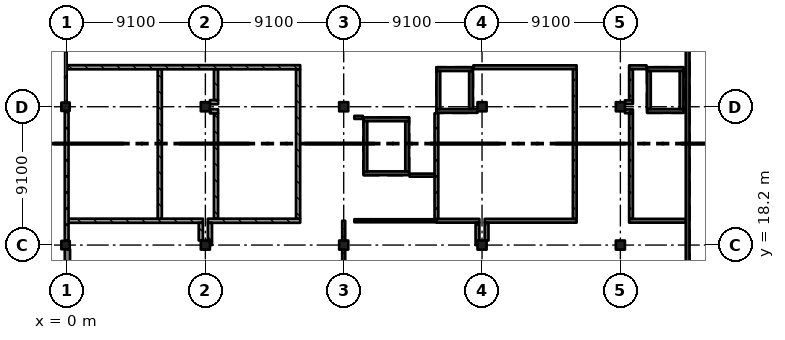
"""IFC4 building model, lengths in metres.
Left out: names, types, materials, properties, quantities, classifications, styles, units other than length and angle.
Written with IfcOpenShell. Run it as: python <this file> out.ifc"""

import sys

from ifc_helpers import new_model, si_unit, direction, frame, frame_2d, origin, origin_2d, place, context, subcontext, project, spatial, rectangle, extrude, element, fill, save


model = new_model("IFC4")
c1 = context("Model", 3, precision=1e-05, world=origin(), true_north=direction((0.0, 1.0)))
c2 = subcontext(c1, "Body", "Model", "MODEL_VIEW")
j1 = project(units=[si_unit("LENGTHUNIT", "METRE"), si_unit("PLANEANGLEUNIT", "RADIAN")], contexts=[c1])
p1 = place(None, origin())
s1 = spatial("IfcSite", under=j1, at=p1, CompositionType="ELEMENT")
p2 = place(p1, origin())
s2 = spatial("IfcBuilding", under=s1, at=p2, CompositionType="ELEMENT")
p3 = place(p2, frame((0.0, 0.0, 20.02)))
s3 = spatial("IfcBuildingStorey", under=s2, at=p3, CompositionType="ELEMENT", Elevation=20.02)
for number, where, z_axis, x_axis in (
    (1, (-0.1, 18.2, 0.0), (0.0, 0.0, 1.0), (1.0, 0.0, 0.0)),
    (2, (-0.1, 27.3, 0.0), (0.0, 0.0, 1.0), (1.0, 0.0, 0.0)),
):
    element("IfcColumn", number, at=place(p3, frame(where, z_axis=z_axis, x_axis=x_axis)), inside=s3, PredefinedType="COLUMN", context=c2, shape_type="SweptSolid", body=[
        extrude(rectangle(XDim=0.55, YDim=0.55, at=origin_2d()), origin(), (0.0, 0.0, 1.0), 4.55),
    ])
for number, where, z_axis, x_axis in (
    (3, (9.1, 18.2, 0.0), (0.0, 0.0, 1.0), (1.0, 0.0, 0.0)),
    (4, (9.1, 27.3, 0.0), (0.0, 0.0, 1.0), (1.0, 0.0, 0.0)),
    (5, (18.2, 18.2, 0.0), (0.0, 0.0, 1.0), (1.0, 0.0, 0.0)),
    (6, (18.2, 27.3, 0.0), (0.0, 0.0, 1.0), (1.0, 0.0, 0.0)),
    (7, (27.3, 18.2, 0.0), (0.0, 0.0, 1.0), (1.0, 0.0, 0.0)),
    (8, (27.3, 27.3, 0.0), (0.0, 0.0, 1.0), (1.0, 0.0, 0.0)),
    (9, (36.4, 18.2, 0.0), (0.0, 0.0, 1.0), (1.0, 0.0, 0.0)),
    (10, (36.4, 27.3, 0.0), (0.0, 0.0, 1.0), (1.0, 0.0, 0.0)),
):
    element("IfcColumn", number, at=place(p3, frame(where, z_axis=z_axis, x_axis=x_axis)), inside=s3, PredefinedType="COLUMN", context=c2, shape_type="SweptSolid", body=[
        extrude(rectangle(XDim=0.6, YDim=0.6, at=origin_2d()), origin(), (0.0, 0.0, 1.0), 4.55),
    ])
p4 = place(p3, frame((40.825, 40.95, 0.0), z_axis=(0.0, 0.0, 1.0), x_axis=(0.0, -1.0, 0.0)))
e11 = element("IfcWall", 11, at=p4, inside=s3, PredefinedType="SHEAR", context=c2, shape_type="SweptSolid", body=[
    extrude(rectangle(XDim=31.85, YDim=0.25, at=frame_2d((15.925, 0.0))), origin(), (0.0, 0.0, 1.0), 4.55),
])
p5 = place(p3, frame((40.55, 27.025, 0.0), z_axis=(0.0, 0.0, 1.0), x_axis=(-1.0, 0.0, 0.0)))
e12 = element("IfcWall", 12, at=p5, inside=s3, PredefinedType="SHEAR", context=c2, shape_type="SweptSolid", body=[
    extrude(rectangle(XDim=2.4, YDim=0.25, at=frame_2d((1.2, 0.0))), origin(), (0.0, 0.0, 1.0), 4.55),
])
p6 = place(p5, frame((0.75, 0.0, 0.0)))
e13 = element("IfcOpeningElement", 13, at=p6, cuts=e12, PredefinedType="OPENING", context=c2, shape_type="SweptSolid", body=[
    extrude(rectangle(XDim=0.9, YDim=2.1, at=frame_2d((0.45, 1.05))), frame((0.0, 0.135, 0.0), z_axis=(0.0, -1.0, 0.0), x_axis=(1.0, 0.0, 0.0)), (0.0, 0.0, 1.0), 0.27),
])
p7 = place(p3, frame((40.55, 29.775, 0.0), z_axis=(0.0, 0.0, 1.0), x_axis=(-1.0, 0.0, 0.0)))
e14 = element("IfcWall", 14, at=p7, inside=s3, PredefinedType="SHEAR", context=c2, shape_type="SweptSolid", body=[
    extrude(rectangle(XDim=2.4, YDim=0.25, at=frame_2d((1.2, 0.0))), origin(), (0.0, 0.0, 1.0), 4.55),
])
for number, where, z_axis, x_axis in (
    (15, (38.275, 29.65, 0.0), (0.0, 0.0, 1.0), (0.0, -1.0, 0.0)),
    (16, (40.425, 29.65, 0.0), (0.0, 0.0, 1.0), (0.0, -1.0, 0.0)),
):
    element("IfcWall", number, at=place(p3, frame(where, z_axis=z_axis, x_axis=x_axis)), inside=s3, PredefinedType="SHEAR", context=c2, shape_type="SweptSolid", body=[
        extrude(rectangle(XDim=2.5, YDim=0.25, at=frame_2d((1.25, 0.0))), origin(), (0.0, 0.0, 1.0), 4.55),
    ])
p8 = place(p3, frame((27.0, 27.025, 0.0), z_axis=(0.0, 0.0, 1.0), x_axis=(-1.0, 0.0, 0.0)))
e17 = element("IfcWall", 17, at=p8, inside=s3, PredefinedType="SHEAR", context=c2, shape_type="SweptSolid", body=[
    extrude(rectangle(XDim=2.7, YDim=0.25, at=frame_2d((1.35, 0.0))), origin(), (0.0, 0.0, 1.0), 4.55),
])
p9 = place(p3, frame((26.7, 29.775, 0.0), z_axis=(0.0, 0.0, 1.0), x_axis=(-1.0, 0.0, 0.0)))
e18 = element("IfcWall", 18, at=p9, inside=s3, PredefinedType="SHEAR", context=c2, shape_type="SweptSolid", body=[
    extrude(rectangle(XDim=2.4, YDim=0.25, at=frame_2d((1.2, 0.0))), origin(), (0.0, 0.0, 1.0), 4.55),
])
p10 = place(p3, frame((24.425, 29.65, 0.0), z_axis=(0.0, 0.0, 1.0), x_axis=(0.0, -1.0, 0.0)))
e19 = element("IfcWall", 19, at=p10, inside=s3, PredefinedType="SHEAR", context=c2, shape_type="SweptSolid", body=[
    extrude(rectangle(XDim=2.5, YDim=0.25, at=frame_2d((1.25, 0.0))), origin(), (0.0, 0.0, 1.0), 4.55),
])
p11 = place(p10, frame((0.9, 0.0, 0.0)))
e20 = element("IfcOpeningElement", 20, at=p11, cuts=e19, PredefinedType="OPENING", context=c2, shape_type="SweptSolid", body=[
    extrude(rectangle(XDim=0.7, YDim=2.1, at=frame_2d((0.35, 1.05))), frame((0.0, 0.135, 0.0), z_axis=(0.0, -1.0, 0.0), x_axis=(1.0, 0.0, 0.0)), (0.0, 0.0, 1.0), 0.27),
])
p12 = place(p3, frame((26.575, 29.65, 0.0), z_axis=(0.0, 0.0, 1.0), x_axis=(0.0, -1.0, 0.0)))
e21 = element("IfcWall", 21, at=p12, inside=s3, PredefinedType="SHEAR", context=c2, shape_type="SweptSolid", body=[
    extrude(rectangle(XDim=2.5, YDim=0.25, at=frame_2d((1.25, 0.0))), origin(), (0.0, 0.0, 1.0), 4.55),
])
p13 = place(p3, frame((22.5, 22.925, 0.0), z_axis=(0.0, 0.0, 1.0), x_axis=(-1.0, 0.0, 0.0)))
e22 = element("IfcWall", 22, at=p13, inside=s3, PredefinedType="SHEAR", context=c2, shape_type="SweptSolid", body=[
    extrude(rectangle(XDim=3.0, YDim=0.25, at=frame_2d((1.5, 0.0))), origin(), (0.0, 0.0, 1.0), 4.55),
])
p14 = place(p13, frame((0.95, 0.0, 0.0)))
e23 = element("IfcOpeningElement", 23, at=p14, cuts=e22, PredefinedType="OPENING", context=c2, shape_type="SweptSolid", body=[
    extrude(rectangle(XDim=1.1, YDim=2.1, at=frame_2d((0.55, 1.05))), frame((0.0, 0.135, 0.0), z_axis=(0.0, -1.0, 0.0), x_axis=(1.0, 0.0, 0.0)), (0.0, 0.0, 1.0), 0.27),
])
p15 = place(p3, frame((22.5, 26.475, 0.0), z_axis=(0.0, 0.0, 1.0), x_axis=(-1.0, 0.0, 0.0)))
e24 = element("IfcWall", 24, at=p15, inside=s3, PredefinedType="SHEAR", context=c2, shape_type="SweptSolid", body=[
    extrude(rectangle(XDim=3.0, YDim=0.25, at=frame_2d((1.5, 0.0))), origin(), (0.0, 0.0, 1.0), 4.55),
])
for number, where, z_axis, x_axis in (
    (25, (19.625, 26.35, 0.0), (0.0, 0.0, 1.0), (0.0, -1.0, 0.0)),
    (26, (22.375, 26.35, 0.0), (0.0, 0.0, 1.0), (0.0, -1.0, 0.0)),
):
    element("IfcWall", number, at=place(p3, frame(where, z_axis=z_axis, x_axis=x_axis)), inside=s3, PredefinedType="SHEAR", context=c2, shape_type="SweptSolid", body=[
        extrude(rectangle(XDim=3.3, YDim=0.25, at=frame_2d((1.65, 0.0))), origin(), (0.0, 0.0, 1.0), 4.55),
    ])
p16 = place(p3, frame((-0.025, 27.025, 0.0), z_axis=(0.0, 0.0, 1.0), x_axis=(0.0, -1.0, 0.0)))
e27 = element("IfcWall", 27, at=p16, inside=s3, PredefinedType="SOLIDWALL", context=c2, shape_type="SweptSolid", body=[
    extrude(rectangle(XDim=8.55, YDim=0.25, at=frame_2d((4.275, 0.0))), origin(), (0.0, 0.0, 1.0), 3.5),
])
p17 = place(p3, frame((0.025, 17.925, 0.0), z_axis=(0.0, 0.0, 1.0), x_axis=(0.0, -1.0, 0.0)))
e28 = element("IfcWall", 28, at=p17, inside=s3, PredefinedType="SOLIDWALL", context=c2, shape_type="SweptSolid", body=[
    extrude(rectangle(XDim=8.575, YDim=0.35, at=frame_2d((4.288, 0.0))), origin(), (0.0, 0.0, 1.0), 3.5),
])
p18 = place(p3, frame((0.03, 29.9, 0.0), z_axis=(0.0, 0.0, 1.0), x_axis=(1.0, 0.0, 0.0)))
e29 = element("IfcWall", 29, at=p18, inside=s3, PredefinedType="SOLIDWALL", context=c2, shape_type="SweptSolid", body=[
    extrude(rectangle(XDim=15.307, YDim=0.275, at=frame_2d((7.654, 0.0))), origin(), (0.0, 0.0, 1.0), 4.25),
])
p19 = place(p3, frame((0.1, 19.8, 0.0), z_axis=(0.0, 0.0, 1.0), x_axis=(1.0, 0.0, 0.0)))
e30 = element("IfcWall", 30, at=p19, inside=s3, PredefinedType="SOLIDWALL", context=c2, shape_type="SweptSolid", body=[
    extrude(rectangle(XDim=8.837, YDim=0.275, at=frame_2d((4.419, 0.0))), origin(), (0.0, 0.0, 1.0), 4.25),
])
p20 = place(p19, frame((6.85, 0.0, 0.0)))
e31 = element("IfcOpeningElement", 31, at=p20, cuts=e30, PredefinedType="OPENING", context=c2, shape_type="SweptSolid", body=[
    extrude(rectangle(XDim=1.2, YDim=2.4, at=frame_2d((0.6, 1.2))), frame((0.0, 0.147, 0.0), z_axis=(0.0, -1.0, 0.0), x_axis=(1.0, 0.0, 0.0)), (0.0, 0.0, 1.0), 0.295),
])
p21 = place(p19, frame((2.65, 0.0, 0.0)))
e32 = element("IfcOpeningElement", 32, at=p21, cuts=e30, PredefinedType="OPENING", context=c2, shape_type="SweptSolid", body=[
    extrude(rectangle(XDim=1.2, YDim=2.4, at=frame_2d((0.6, 1.2))), frame((0.0, 0.147, 0.0), z_axis=(0.0, -1.0, 0.0), x_axis=(1.0, 0.0, 0.0)), (0.0, 0.0, 1.0), 0.295),
])
p22 = place(p3, frame((6.1, 29.762, 0.0), z_axis=(0.0, 0.0, 1.0), x_axis=(0.0, -1.0, 0.0)))
e33 = element("IfcWall", 33, at=p22, inside=s3, PredefinedType="SOLIDWALL", context=c2, shape_type="SweptSolid", body=[
    extrude(rectangle(XDim=9.825, YDim=0.275, at=frame_2d((4.913, 0.0))), origin(), (0.0, 0.0, 1.0), 4.25),
])
p23 = place(p3, frame((8.8, 19.663, 0.0), z_axis=(0.0, 0.0, 1.0), x_axis=(0.0, -1.0, 0.0)))
e34 = element("IfcWall", 34, at=p23, inside=s3, PredefinedType="SOLIDWALL", context=c2, shape_type="SweptSolid", body=[
    extrude(rectangle(XDim=1.163, YDim=0.275, at=frame_2d((0.581, 0.0))), origin(), (0.0, 0.0, 1.0), 4.25),
])
p24 = place(p3, frame((9.262, 19.8, 0.0), z_axis=(0.0, 0.0, 1.0), x_axis=(1.0, 0.0, 0.0)))
e35 = element("IfcWall", 35, at=p24, inside=s3, PredefinedType="SOLIDWALL", context=c2, shape_type="SweptSolid", body=[
    extrude(rectangle(XDim=6.075, YDim=0.275, at=frame_2d((3.038, 0.0))), origin(), (0.0, 0.0, 1.0), 4.25),
])
p25 = place(p24, frame((2.688, 0.0, 0.0)))
e36 = element("IfcOpeningElement", 36, at=p25, cuts=e35, PredefinedType="OPENING", context=c2, shape_type="SweptSolid", body=[
    extrude(rectangle(XDim=1.2, YDim=2.4, at=frame_2d((0.6, 1.2))), frame((0.0, 0.147, 0.0), z_axis=(0.0, -1.0, 0.0), x_axis=(1.0, 0.0, 0.0)), (0.0, 0.0, 1.0), 0.295),
])
p26 = place(p3, frame((9.4, 18.2, 0.0), z_axis=(0.0, 0.0, 1.0), x_axis=(0.0, 1.0, 0.0)))
e37 = element("IfcWall", 37, at=p26, inside=s3, PredefinedType="SOLIDWALL", context=c2, shape_type="SweptSolid", body=[
    extrude(rectangle(XDim=1.463, YDim=0.275, at=frame_2d((0.731, 0.0))), origin(), (0.0, 0.0, 1.0), 4.25),
])
p27 = place(p3, frame((9.4, 27.6, 0.0), z_axis=(0.0, 0.0, 1.0), x_axis=(1.0, 0.0, 0.0)))
e38 = element("IfcWall", 38, at=p27, inside=s3, PredefinedType="SOLIDWALL", context=c2, shape_type="SweptSolid", body=[
    extrude(rectangle(XDim=0.538, YDim=0.275, at=frame_2d((0.269, 0.0))), origin(), (0.0, 0.0, 1.0), 4.25),
])
p28 = place(p3, frame((9.8, 19.938, 0.0), z_axis=(0.0, 0.0, 1.0), x_axis=(0.0, 1.0, 0.0)))
e39 = element("IfcWall", 39, at=p28, inside=s3, PredefinedType="SOLIDWALL", context=c2, shape_type="SweptSolid", body=[
    extrude(rectangle(XDim=6.925, YDim=0.275, at=frame_2d((3.462, 0.0))), origin(), (0.0, 0.0, 1.0), 4.25),
])
p29 = place(p3, frame((9.8, 27.738, 0.0), z_axis=(0.0, 0.0, 1.0), x_axis=(0.0, 1.0, 0.0)))
e40 = element("IfcWall", 40, at=p29, inside=s3, PredefinedType="SOLIDWALL", context=c2, shape_type="SweptSolid", body=[
    extrude(rectangle(XDim=2.025, YDim=0.275, at=frame_2d((1.012, 0.0))), origin(), (0.0, 0.0, 1.0), 4.25),
])
p30 = place(p3, frame((9.938, 27.0, 0.0), z_axis=(0.0, 0.0, 1.0), x_axis=(-1.0, 0.0, 0.0)))
e41 = element("IfcWall", 41, at=p30, inside=s3, PredefinedType="SOLIDWALL", context=c2, shape_type="SweptSolid", body=[
    extrude(rectangle(XDim=0.538, YDim=0.275, at=frame_2d((0.269, 0.0))), origin(), (0.0, 0.0, 1.0), 4.25),
])
p31 = place(p3, frame((15.2, 29.762, 0.0), z_axis=(0.0, 0.0, 1.0), x_axis=(0.0, -1.0, 0.0)))
e42 = element("IfcWall", 42, at=p31, inside=s3, PredefinedType="SOLIDWALL", context=c2, shape_type="SweptSolid", body=[
    extrude(rectangle(XDim=9.825, YDim=0.275, at=frame_2d((4.913, 0.0))), origin(), (0.0, 0.0, 1.0), 4.25),
])
p32 = place(p3, frame((18.2, 17.9, 0.0), z_axis=(0.0, 0.0, 1.0), x_axis=(0.0, -1.0, 0.0)))
e43 = element("IfcWall", 43, at=p32, inside=s3, PredefinedType="PARTITIONING", context=c2, shape_type="SweptSolid", body=[
    extrude(rectangle(XDim=6.962, YDim=0.2, at=frame_2d((3.481, 0.0))), origin(), (0.0, 0.0, 1.0), 3.5),
])
p33 = place(p32, frame((0.85, 0.0, 0.0)))
e44 = element("IfcOpeningElement", 44, at=p33, cuts=e43, PredefinedType="OPENING", context=c2, shape_type="SweptSolid", body=[
    extrude(rectangle(XDim=1.8, YDim=2.4, at=frame_2d((0.9, 1.2))), frame((0.0, 0.11, 0.0), z_axis=(0.0, -1.0, 0.0), x_axis=(1.0, 0.0, 0.0)), (0.0, 0.0, 1.0), 0.22),
])
p34 = place(p32, frame((4.35, 0.0, 0.0)))
e45 = element("IfcOpeningElement", 45, at=p34, cuts=e43, PredefinedType="OPENING", context=c2, shape_type="SweptSolid", body=[
    extrude(rectangle(XDim=1.8, YDim=2.4, at=frame_2d((0.9, 1.2))), frame((0.0, 0.11, 0.0), z_axis=(0.0, -1.0, 0.0), x_axis=(1.0, 0.0, 0.0)), (0.0, 0.0, 1.0), 0.22),
])
p35 = place(p3, frame((18.2, 19.8, 0.0), z_axis=(0.0, 0.0, 1.0), x_axis=(0.0, -1.0, 0.0)))
e46 = element("IfcWall", 46, at=p35, inside=s3, PredefinedType="PARTITIONING", context=c2, shape_type="SweptSolid", body=[
    extrude(rectangle(XDim=1.3, YDim=0.2, at=frame_2d((0.65, 0.0))), origin(), (0.0, 0.0, 1.0), 3.5),
])
p36 = place(p3, frame((18.9, 19.8, 0.0), z_axis=(0.0, 0.0, 1.0), x_axis=(1.0, 0.0, 0.0)))
e47 = element("IfcWall", 47, at=p36, inside=s3, PredefinedType="PARTITIONING", context=c2, shape_type="SweptSolid", body=[
    extrude(rectangle(XDim=5.4, YDim=0.2, at=frame_2d((2.7, 0.0))), origin(), (0.0, 0.0, 1.0), 4.25),
])
p37 = place(p36, frame((1.85, 0.0, 0.0)))
e48 = element("IfcOpeningElement", 48, at=p37, cuts=e47, PredefinedType="OPENING", context=c2, shape_type="SweptSolid", body=[
    extrude(rectangle(XDim=1.8, YDim=2.4, at=frame_2d((0.9, 1.2))), frame((0.0, 0.11, 0.0), z_axis=(0.0, -1.0, 0.0), x_axis=(1.0, 0.0, 0.0)), (0.0, 0.0, 1.0), 0.22),
])
p38 = place(p3, frame((18.9, 26.6, 0.0), z_axis=(0.0, 0.0, 1.0), x_axis=(1.0, 0.0, 0.0)))
e49 = element("IfcWall", 49, at=p38, inside=s3, PredefinedType="PARTITIONING", context=c2, shape_type="SweptSolid", body=[
    extrude(rectangle(XDim=0.57, YDim=0.2, at=frame_2d((0.285, 0.0))), origin(), (0.0, 0.0, 1.0), 4.25),
])
p39 = place(p3, frame((22.53, 22.8, 0.0), z_axis=(0.0, 0.0, 1.0), x_axis=(1.0, 0.0, 0.0)))
e50 = element("IfcWall", 50, at=p39, inside=s3, PredefinedType="PARTITIONING", context=c2, shape_type="SweptSolid", body=[
    extrude(rectangle(XDim=1.645, YDim=0.2, at=frame_2d((0.823, 0.0))), origin(), (0.0, 0.0, 1.0), 4.25),
])
p40 = place(p3, frame((24.3, 19.8, 0.0), z_axis=(0.0, 0.0, 1.0), x_axis=(1.0, 0.0, 0.0)))
e51 = element("IfcWall", 51, at=p40, inside=s3, PredefinedType="SOLIDWALL", context=c2, shape_type="SweptSolid", body=[
    extrude(rectangle(XDim=2.825, YDim=0.25, at=frame_2d((1.413, 0.0))), origin(), (0.0, 0.0, 1.0), 4.25),
])
p41 = place(p3, frame((24.3, 19.925, 0.0), z_axis=(0.0, 0.0, 1.0), x_axis=(0.0, 1.0, 0.0)))
e52 = element("IfcWall", 52, at=p41, inside=s3, PredefinedType="SOLIDWALL", context=c2, shape_type="SweptSolid", body=[
    extrude(rectangle(XDim=6.945, YDim=0.25, at=frame_2d((3.473, 0.0))), origin(), (0.0, 0.0, 1.0), 4.25),
])
p42 = place(p3, frame((26.73, 29.9, 0.0), z_axis=(0.0, 0.0, 1.0), x_axis=(1.0, 0.0, 0.0)))
e53 = element("IfcWall", 53, at=p42, inside=s3, PredefinedType="SOLIDWALL", context=c2, shape_type="SweptSolid", body=[
    extrude(rectangle(XDim=6.795, YDim=0.25, at=frame_2d((3.397, 0.0))), origin(), (0.0, 0.0, 1.0), 4.25),
])
p43 = place(p3, frame((27.0, 18.2, 0.0), z_axis=(0.0, 0.0, 1.0), x_axis=(0.0, 1.0, 0.0)))
e54 = element("IfcWall", 54, at=p43, inside=s3, PredefinedType="SOLIDWALL", context=c2, shape_type="SweptSolid", body=[
    extrude(rectangle(XDim=1.475, YDim=0.25, at=frame_2d((0.738, 0.0))), origin(), (0.0, 0.0, 1.0), 4.25),
])
p44 = place(p3, frame((27.475, 19.8, 0.0), z_axis=(0.0, 0.0, 1.0), x_axis=(1.0, 0.0, 0.0)))
e55 = element("IfcWall", 55, at=p44, inside=s3, PredefinedType="SOLIDWALL", context=c2, shape_type="SweptSolid", body=[
    extrude(rectangle(XDim=6.05, YDim=0.25, at=frame_2d((3.025, 0.0))), origin(), (0.0, 0.0, 1.0), 4.25),
])
p45 = place(p44, frame((2.55, 0.0, 0.0)))
e56 = element("IfcOpeningElement", 56, at=p45, cuts=e55, PredefinedType="OPENING", context=c2, shape_type="SweptSolid", body=[
    extrude(rectangle(XDim=1.0, YDim=2.1, at=frame_2d((0.5, 1.05))), frame((0.0, 0.135, 0.0), z_axis=(0.0, -1.0, 0.0), x_axis=(1.0, 0.0, 0.0)), (0.0, 0.0, 1.0), 0.27),
])
p46 = place(p3, frame((27.6, 18.5, 0.0), z_axis=(0.0, 0.0, 1.0), x_axis=(0.0, 1.0, 0.0)))
e57 = element("IfcWall", 57, at=p46, inside=s3, PredefinedType="SOLIDWALL", context=c2, shape_type="SweptSolid", body=[
    extrude(rectangle(XDim=1.175, YDim=0.25, at=frame_2d((0.587, 0.0))), origin(), (0.0, 0.0, 1.0), 4.25),
])
p47 = place(p3, frame((33.4, 29.775, 0.0), z_axis=(0.0, 0.0, 1.0), x_axis=(0.0, -1.0, 0.0)))
e58 = element("IfcWall", 58, at=p47, inside=s3, PredefinedType="SOLIDWALL", context=c2, shape_type="SweptSolid", body=[
    extrude(rectangle(XDim=9.85, YDim=0.25, at=frame_2d((4.925, 0.0))), origin(), (0.0, 0.0, 1.0), 4.25),
])
p48 = place(p3, frame((36.7, 27.0, 0.0), z_axis=(0.0, 0.0, 1.0), x_axis=(1.0, 0.0, 0.0)))
e59 = element("IfcWall", 59, at=p48, inside=s3, PredefinedType="SOLIDWALL", context=c2, shape_type="SweptSolid", body=[
    extrude(rectangle(XDim=0.525, YDim=0.25, at=frame_2d((0.263, 0.0))), origin(), (0.0, 0.0, 1.0), 4.25),
])
p49 = place(p3, frame((36.975, 19.8, 0.0), z_axis=(0.0, 0.0, 1.0), x_axis=(1.0, 0.0, 0.0)))
e60 = element("IfcWall", 60, at=p49, inside=s3, PredefinedType="SOLIDWALL", context=c2, shape_type="SweptSolid", body=[
    extrude(rectangle(XDim=3.725, YDim=0.25, at=frame_2d((1.862, 0.0))), origin(), (0.0, 0.0, 1.0), 4.25),
])
p50 = place(p49, frame((1.45, 0.0, 0.0)))
e61 = element("IfcOpeningElement", 61, at=p50, cuts=e60, PredefinedType="OPENING", context=c2, shape_type="SweptSolid", body=[
    extrude(rectangle(XDim=0.8, YDim=2.1, at=frame_2d((0.4, 1.05))), frame((0.0, 0.135, 0.0), z_axis=(0.0, -1.0, 0.0), x_axis=(1.0, 0.0, 0.0)), (0.0, 0.0, 1.0), 0.27),
])
p51 = place(p3, frame((36.975, 29.9, 0.0), z_axis=(0.0, 0.0, 1.0), x_axis=(1.0, 0.0, 0.0)))
e62 = element("IfcWall", 62, at=p51, inside=s3, PredefinedType="SOLIDWALL", context=c2, shape_type="SweptSolid", body=[
    extrude(rectangle(XDim=1.145, YDim=0.25, at=frame_2d((0.573, 0.0))), origin(), (0.0, 0.0, 1.0), 4.25),
])
p52 = place(p3, frame((37.1, 26.875, 0.0), z_axis=(0.0, 0.0, 1.0), x_axis=(0.0, -1.0, 0.0)))
e63 = element("IfcWall", 63, at=p52, inside=s3, PredefinedType="SOLIDWALL", context=c2, shape_type="SweptSolid", body=[
    extrude(rectangle(XDim=6.95, YDim=0.25, at=frame_2d((3.475, 0.0))), origin(), (0.0, 0.0, 1.0), 4.25),
])
p53 = place(p3, frame((37.1, 29.775, 0.0), z_axis=(0.0, 0.0, 1.0), x_axis=(0.0, -1.0, 0.0)))
e64 = element("IfcWall", 64, at=p53, inside=s3, PredefinedType="SOLIDWALL", context=c2, shape_type="SweptSolid", body=[
    extrude(rectangle(XDim=2.05, YDim=0.25, at=frame_2d((1.025, 0.0))), origin(), (0.0, 0.0, 1.0), 4.25),
])
p54 = place(p3, frame((37.225, 27.6, 0.0), z_axis=(0.0, 0.0, 1.0), x_axis=(-1.0, 0.0, 0.0)))
e65 = element("IfcWall", 65, at=p54, inside=s3, PredefinedType="SOLIDWALL", context=c2, shape_type="SweptSolid", body=[
    extrude(rectangle(XDim=0.525, YDim=0.25, at=frame_2d((0.263, 0.0))), origin(), (0.0, 0.0, 1.0), 4.25),
])
p55 = place(p20, origin())
e66 = element("IfcDoor", 66, at=p55, inside=s3, OperationType="SINGLE_SWING_LEFT", PredefinedType="DOOR", context=c2, shape_type="SweptSolid", body=[
    extrude(rectangle(XDim=1.2, YDim=2.4, at=frame_2d((0.6, 1.2))), frame((0.0, 0.025, 0.0), z_axis=(0.0, -1.0, 0.0), x_axis=(1.0, 0.0, 0.0)), (0.0, 0.0, 1.0), 0.05),
])
fill(e31, e66)
p56 = place(p45, origin())
e67 = element("IfcDoor", 67, at=p56, inside=s3, OperationType="SINGLE_SWING_LEFT", PredefinedType="DOOR", context=c2, shape_type="SweptSolid", body=[
    extrude(rectangle(XDim=1.0, YDim=2.1, at=frame_2d((0.5, 1.05))), frame((0.0, 0.025, 0.0), z_axis=(0.0, -1.0, 0.0), x_axis=(1.0, 0.0, 0.0)), (0.0, 0.0, 1.0), 0.05),
])
fill(e56, e67)
p57 = place(p50, origin())
e68 = element("IfcDoor", 68, at=p57, inside=s3, OperationType="SINGLE_SWING_RIGHT", PredefinedType="DOOR", context=c2, shape_type="SweptSolid", body=[
    extrude(rectangle(XDim=0.8, YDim=2.1, at=frame_2d((0.4, 1.05))), frame((0.0, 0.025, 0.0), z_axis=(0.0, -1.0, 0.0), x_axis=(1.0, 0.0, 0.0)), (0.0, 0.0, 1.0), 0.05),
])
fill(e61, e68)
p58 = place(p21, origin())
e69 = element("IfcDoor", 69, at=p58, inside=s3, OperationType="SINGLE_SWING_RIGHT", PredefinedType="DOOR", context=c2, shape_type="SweptSolid", body=[
    extrude(rectangle(XDim=1.2, YDim=2.4, at=frame_2d((0.6, 1.2))), frame((0.0, 0.025, 0.0), z_axis=(0.0, -1.0, 0.0), x_axis=(1.0, 0.0, 0.0)), (0.0, 0.0, 1.0), 0.05),
])
fill(e32, e69)
p59 = place(p25, origin())
e70 = element("IfcDoor", 70, at=p59, inside=s3, OperationType="SINGLE_SWING_RIGHT", PredefinedType="DOOR", context=c2, shape_type="SweptSolid", body=[
    extrude(rectangle(XDim=1.2, YDim=2.4, at=frame_2d((0.6, 1.2))), frame((0.0, 0.025, 0.0), z_axis=(0.0, -1.0, 0.0), x_axis=(1.0, 0.0, 0.0)), (0.0, 0.0, 1.0), 0.05),
])
fill(e36, e70)
p60 = place(p37, origin())
e71 = element("IfcDoor", 71, at=p60, inside=s3, OperationType="DOUBLE_DOOR_SINGLE_SWING", PredefinedType="DOOR", context=c2, shape_type="SweptSolid", body=[
    extrude(rectangle(XDim=1.8, YDim=2.4, at=frame_2d((0.9, 1.2))), frame((0.0, 0.025, 0.0), z_axis=(0.0, -1.0, 0.0), x_axis=(1.0, 0.0, 0.0)), (0.0, 0.0, 1.0), 0.05),
])
fill(e48, e71)
p61 = place(p6, origin())
e72 = element("IfcDoor", 72, at=p61, inside=s3, OperationType="SINGLE_SWING_RIGHT", PredefinedType="DOOR", context=c2, shape_type="SweptSolid", body=[
    extrude(rectangle(XDim=0.9, YDim=2.1, at=frame_2d((0.45, 1.05))), frame((0.0, 0.025, 0.0), z_axis=(0.0, -1.0, 0.0), x_axis=(1.0, 0.0, 0.0)), (0.0, 0.0, 1.0), 0.05),
])
fill(e13, e72)
p62 = place(p11, origin())
e73 = element("IfcDoor", 73, at=p62, inside=s3, OperationType="SINGLE_SWING_LEFT", PredefinedType="DOOR", context=c2, shape_type="SweptSolid", body=[
    extrude(rectangle(XDim=0.7, YDim=2.1, at=frame_2d((0.35, 1.05))), frame((0.0, 0.025, 0.0), z_axis=(0.0, -1.0, 0.0), x_axis=(1.0, 0.0, 0.0)), (0.0, 0.0, 1.0), 0.05),
])
fill(e20, e73)
p63 = place(p14, origin())
e74 = element("IfcDoor", 74, at=p63, inside=s3, OperationType="DOUBLE_DOOR_SLIDING", PredefinedType="DOOR", context=c2, shape_type="SweptSolid", body=[
    extrude(rectangle(XDim=1.1, YDim=2.1, at=frame_2d((0.55, 1.05))), frame((0.0, 0.025, 0.0), z_axis=(0.0, -1.0, 0.0), x_axis=(1.0, 0.0, 0.0)), (0.0, 0.0, 1.0), 0.05),
])
fill(e23, e74)
save(model, sys.argv[1])
